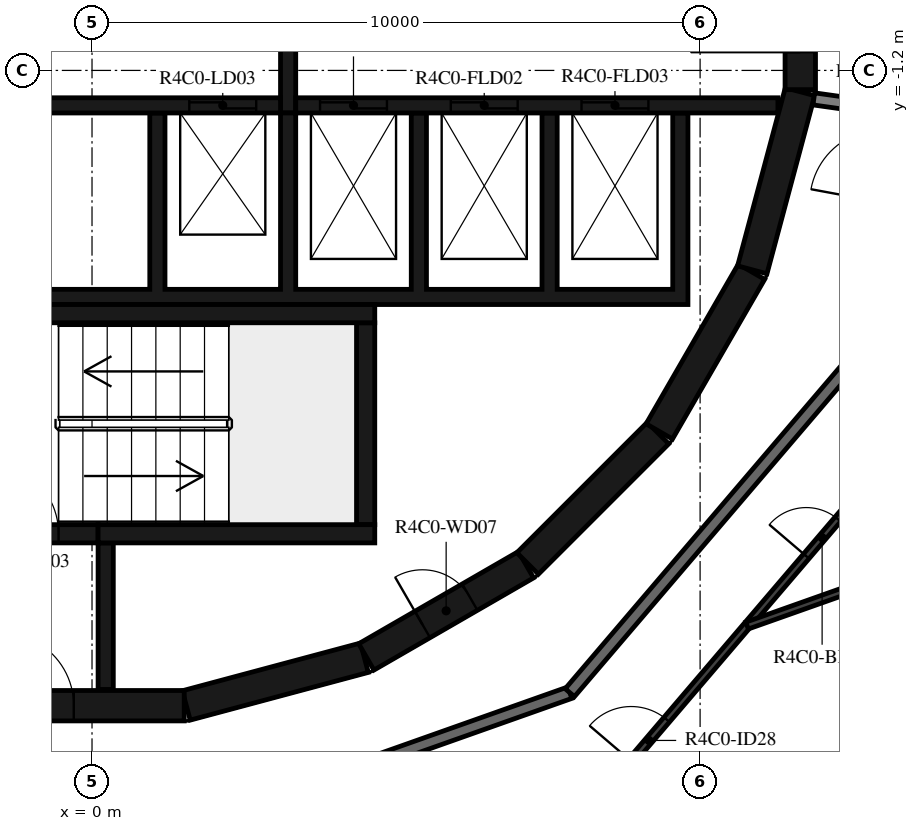
"""IFC4 building model, lengths in metres.
Left out: names, types, materials, properties, quantities, classifications, styles, units other than length and angle.
Written with IfcOpenShell. Run it as: python <this file> out.ifc"""

import sys

from ifc_helpers import new_model, si_unit, direction, frame, frame_2d, origin, place, context, subcontext, project, spatial, polyline, rectangle, outline, extrude, element, fill, save


model = new_model("IFC4")
c1 = context("Model", 3, precision=1e-05, world=origin(), true_north=direction((0.0, 1.0)))
c2 = subcontext(c1, "Body", "Model", "MODEL_VIEW")
j1 = project(units=[si_unit("LENGTHUNIT", "METRE"), si_unit("PLANEANGLEUNIT", "RADIAN")], contexts=[c1])
p1 = place(None, origin())
s1 = spatial("IfcSite", under=j1, at=p1, CompositionType="ELEMENT")
p2 = place(p1, origin())
s2 = spatial("IfcBuilding", under=s1, at=p2, CompositionType="ELEMENT")
p3 = place(p2, frame((0.0, 0.0, 179.7)))
s3 = spatial("IfcBuildingStorey", under=s2, at=p3, CompositionType="ELEMENT", Elevation=179.7)
p4 = place(p3, frame((1.55, -11.643, 0.0), z_axis=(0.0, 0.0, 1.0), x_axis=(0.965948410781, 0.258734743916, 0.0)))
e1 = element("IfcWall", 1, at=p4, inside=s3, PredefinedType="SHEAR", context=c2, shape_type="SweptSolid", body=[
    extrude(rectangle(XDim=3.033, YDim=0.5, at=frame_2d((1.516, 0.0))), origin(), (0.0, 0.0, 1.0), 3.05),
])
p5 = place(p3, frame((4.51, -10.845, 0.0), z_axis=(0.0, 0.0, 1.0), x_axis=(0.865975092491, 0.500087131594, 0.0)))
e2 = element("IfcWall", 2, at=p5, inside=s3, PredefinedType="SHEAR", context=c2, shape_type="SweptSolid", body=[
    extrude(rectangle(XDim=3.033, YDim=0.5, at=frame_2d((1.516, 0.0))), origin(), (0.0, 0.0, 1.0), 3.05),
])
p6 = place(p5, frame((1.066, 0.0, 0.0)))
e3 = element("IfcOpeningElement", 3, at=p6, cuts=e2, PredefinedType="OPENING", context=c2, shape_type="SweptSolid", body=[
    extrude(rectangle(XDim=0.9, YDim=2.1, at=frame_2d((0.45, 1.05))), frame((0.0, 0.26, 0.0), z_axis=(0.0, -1.0, 0.0), x_axis=(1.0, 0.0, 0.0)), (0.0, 0.0, 1.0), 0.52),
])
p7 = place(p3, frame((7.164, -9.308, 0.0), z_axis=(0.0, 0.0, 1.0), x_axis=(0.707106781187, 0.707106781187, 0.0)))
e4 = element("IfcWall", 4, at=p7, inside=s3, PredefinedType="SHEAR", context=c2, shape_type="SweptSolid", body=[
    extrude(rectangle(XDim=3.032, YDim=0.5, at=frame_2d((1.516, 0.0))), origin(), (0.0, 0.0, 1.0), 3.05),
])
for number, where, z_axis, x_axis in (
    (5, (9.329, -7.137, 0.0), (0.0, 0.0, 1.0), (0.5, 0.866, 0.0)),
    (6, (10.858, -4.479, 0.0), (0.0, 0.0, 1.0), (0.259, 0.966, 0.0)),
):
    element("IfcWall", number, at=place(p3, frame(where, z_axis=z_axis, x_axis=x_axis)), inside=s3, PredefinedType="SHEAR", context=c2, shape_type="SweptSolid", body=[
        extrude(rectangle(XDim=3.033, YDim=0.5, at=frame_2d((1.516, 0.0))), origin(), (0.0, 0.0, 1.0), 3.05),
    ])
p8 = place(p3, frame((11.647, -1.516, 0.0), z_axis=(0.0, 0.0, 1.0), x_axis=(0.0, 1.0, 0.0)))
e7 = element("IfcWall", 7, at=p8, inside=s3, PredefinedType="SHEAR", context=c2, shape_type="SweptSolid", body=[
    extrude(rectangle(XDim=3.033, YDim=0.5, at=frame_2d((1.516, 0.0))), origin(), (0.0, 0.0, 1.0), 3.05),
])
p9 = place(p8, frame((0.616, 0.0, 0.0)))
e8 = element("IfcOpeningElement", 8, at=p9, cuts=e7, PredefinedType="OPENING", context=c2, shape_type="SweptSolid", body=[
    extrude(rectangle(XDim=1.8, YDim=2.1, at=frame_2d((0.9, 1.05))), frame((0.0, 0.26, 0.0), z_axis=(0.0, -1.0, 0.0), x_axis=(1.0, 0.0, 0.0)), (0.0, 0.0, 1.0), 0.52),
])
p10 = place(p3, frame((-1.516, -11.647, 0.0), z_axis=(0.0, 0.0, 1.0), x_axis=(1.0, 0.0, 0.0)))
e9 = element("IfcWall", 9, at=p10, inside=s3, PredefinedType="SHEAR", context=c2, shape_type="SweptSolid", body=[
    extrude(rectangle(XDim=3.033, YDim=0.5, at=frame_2d((1.516, 0.0))), origin(), (0.0, 0.0, 1.0), 3.05),
])
p11 = place(p10, frame((0.016, 0.0, 0.0)))
e10 = element("IfcOpeningElement", 10, at=p11, cuts=e9, PredefinedType="OPENING", context=c2, shape_type="SweptSolid", body=[
    extrude(rectangle(XDim=1.2, YDim=2.1, at=frame_2d((0.6, 1.05))), frame((0.0, 0.26, 0.0), z_axis=(0.0, -1.0, 0.0), x_axis=(1.0, 0.0, 0.0)), (0.0, 0.0, 1.0), 0.52),
])
p12 = place(p3, frame((-2.4, -5.2, 0.0), z_axis=(0.0, 0.0, 1.0), x_axis=(1.0, 0.0, 0.0)))
e11 = element("IfcWall", 11, at=p12, inside=s3, PredefinedType="SHEAR", context=c2, shape_type="SweptSolid", body=[
    extrude(rectangle(XDim=7.05, YDim=0.3, at=frame_2d((3.525, 0.0))), origin(), (0.0, 0.0, 1.0), 3.05),
])
p13 = place(p3, frame((4.5, -8.67, 0.0), z_axis=(0.0, 0.0, 1.0), x_axis=(0.0, 1.0, 0.0)))
e12 = element("IfcWall", 12, at=p13, inside=s3, PredefinedType="SHEAR", context=c2, shape_type="SweptSolid", body=[
    extrude(rectangle(XDim=3.32, YDim=0.3, at=frame_2d((1.66, 0.0))), origin(), (0.0, 0.0, 1.0), 3.05),
])
p14 = place(p3, frame((0.1, -8.82, 0.0), z_axis=(0.0, 0.0, 1.0), x_axis=(1.0, 0.0, 0.0)))
e13 = element("IfcWall", 13, at=p14, inside=s3, PredefinedType="SHEAR", context=c2, shape_type="SweptSolid", body=[
    extrude(rectangle(XDim=4.55, YDim=0.3, at=frame_2d((2.275, 0.0))), origin(), (0.0, 0.0, 1.0), 3.05),
])
p15 = place(p3, frame((-2.4, -8.82, 0.0), z_axis=(0.0, 0.0, 1.0), x_axis=(1.0, 0.0, 0.0)))
e14 = element("IfcWall", 14, at=p15, inside=s3, PredefinedType="SHEAR", context=c2, shape_type="SweptSolid", body=[
    extrude(rectangle(XDim=2.5, YDim=0.3, at=frame_2d((1.25, 0.0))), origin(), (0.0, 0.0, 1.0), 3.05),
])
p16 = place(p15, frame((0.65, 0.0, 0.0)))
e15 = element("IfcOpeningElement", 15, at=p16, cuts=e14, PredefinedType="OPENING", context=c2, shape_type="SweptSolid", body=[
    extrude(rectangle(XDim=1.2, YDim=2.1, at=frame_2d((0.6, 1.05))), frame((0.0, 0.16, 0.0), z_axis=(0.0, -1.0, 0.0), x_axis=(1.0, 0.0, 0.0)), (0.0, 0.0, 1.0), 0.32),
])
p17 = place(p3, frame((0.225, -8.97, 0.0), z_axis=(0.0, 0.0, 1.0), x_axis=(0.0, -1.0, 0.0)))
e16 = element("IfcWall", 16, at=p17, inside=s3, PredefinedType="SHEAR", context=c2, shape_type="SweptSolid", body=[
    extrude(rectangle(XDim=2.41, YDim=0.25, at=frame_2d((1.205, 0.0))), origin(), (0.0, 0.0, 1.0), 3.05),
])
p18 = place(p3, origin())
e17 = element("IfcWall", 17, at=p18, inside=s3, PredefinedType="SHEAR", context=c2, shape_type="SweptSolid", body=[
    extrude(outline(polyline([(9.8, -5.05), (9.8, -4.8), (9.8, -1.9), (9.55, -1.9), (9.55, -4.8), (7.65, -4.8), (7.65, -1.9), (7.4, -1.9), (7.4, -4.8), (5.5, -4.8), (5.5, -1.9), (5.25, -1.9), (5.25, -4.8), (3.35, -4.8), (3.35, -1.9), (3.1, -1.9), (3.1, -4.8), (1.2, -4.8), (1.2, -1.9), (0.95, -1.9), (0.95, -4.8), (-5.25, -4.8), (-5.25, -1.9), (-5.5, -1.9), (-5.5, -4.8), (-7.4, -4.8), (-7.4, -1.9), (-7.65, -1.9), (-7.65, -4.8), (-9.55, -4.8), (-9.55, -1.9), (-9.8, -1.9), (-9.8, -4.8), (-9.8, -5.05), (9.8, -5.05)])), origin(), (0.0, 0.0, 1.0), 3.05),
])
p19 = place(p3, frame((-11.28, -1.775, 0.0), z_axis=(0.0, 0.0, 1.0), x_axis=(1.0, 0.0, 0.0)))
e18 = element("IfcWall", 18, at=p19, inside=s3, PredefinedType="SHEAR", context=c2, shape_type="SweptSolid", body=[
    extrude(rectangle(XDim=14.38, YDim=0.25, at=frame_2d((7.19, 0.0))), origin(), (0.0, 0.0, 1.0), 3.05),
])
p20 = place(p19, frame((12.88, 0.0, 0.0)))
e19 = element("IfcOpeningElement", 19, at=p20, cuts=e18, PredefinedType="OPENING", context=c2, shape_type="SweptSolid", body=[
    extrude(rectangle(XDim=1.1, YDim=2.1, at=frame_2d((0.55, 1.05))), frame((0.0, 0.135, 0.0), z_axis=(0.0, -1.0, 0.0), x_axis=(1.0, 0.0, 0.0)), (0.0, 0.0, 1.0), 0.27),
])
p21 = place(p19, frame((8.68, 0.0, 0.0)))
e20 = element("IfcOpeningElement", 20, at=p21, cuts=e18, PredefinedType="OPENING", context=c2, shape_type="SweptSolid", body=[
    extrude(rectangle(XDim=0.9, YDim=2.1, at=frame_2d((0.45, 1.05))), frame((0.0, 0.135, 0.0), z_axis=(0.0, -1.0, 0.0), x_axis=(1.0, 0.0, 0.0)), (0.0, 0.0, 1.0), 0.27),
])
p22 = place(p3, frame((3.35, -1.775, 0.0), z_axis=(0.0, 0.0, 1.0), x_axis=(1.0, 0.0, 0.0)))
e21 = element("IfcWall", 21, at=p22, inside=s3, PredefinedType="SHEAR", context=c2, shape_type="SweptSolid", body=[
    extrude(rectangle(XDim=7.93, YDim=0.25, at=frame_2d((3.965, 0.0))), origin(), (0.0, 0.0, 1.0), 3.05),
])
p23 = place(p22, frame((0.4, 0.0, 0.0)))
e22 = element("IfcOpeningElement", 22, at=p23, cuts=e21, PredefinedType="OPENING", context=c2, shape_type="SweptSolid", body=[
    extrude(rectangle(XDim=1.1, YDim=2.4, at=frame_2d((0.55, 1.2))), frame((0.0, 0.135, 0.0), z_axis=(0.0, -1.0, 0.0), x_axis=(1.0, 0.0, 0.0)), (0.0, 0.0, 1.0), 0.27),
])
p24 = place(p22, frame((2.55, 0.0, 0.0)))
e23 = element("IfcOpeningElement", 23, at=p24, cuts=e21, PredefinedType="OPENING", context=c2, shape_type="SweptSolid", body=[
    extrude(rectangle(XDim=1.1, YDim=2.4, at=frame_2d((0.55, 1.2))), frame((0.0, 0.135, 0.0), z_axis=(0.0, -1.0, 0.0), x_axis=(1.0, 0.0, 0.0)), (0.0, 0.0, 1.0), 0.27),
])
p25 = place(p22, frame((4.7, 0.0, 0.0)))
e24 = element("IfcOpeningElement", 24, at=p25, cuts=e21, PredefinedType="OPENING", context=c2, shape_type="SweptSolid", body=[
    extrude(rectangle(XDim=1.1, YDim=2.4, at=frame_2d((0.55, 1.2))), frame((0.0, 0.135, 0.0), z_axis=(0.0, -1.0, 0.0), x_axis=(1.0, 0.0, 0.0)), (0.0, 0.0, 1.0), 0.27),
])
p26 = place(p3, frame((3.225, -1.9, 0.0), z_axis=(0.0, 0.0, 1.0), x_axis=(0.0, 1.0, 0.0)))
e25 = element("IfcWall", 25, at=p26, inside=s3, PredefinedType="SHEAR", context=c2, shape_type="SweptSolid", body=[
    extrude(rectangle(XDim=3.8, YDim=0.25, at=frame_2d((1.9, 0.0))), origin(), (0.0, 0.0, 1.0), 3.05),
])
p27 = place(p3, frame((13.282, -1.867, 0.0), z_axis=(0.0, 0.0, 1.0), x_axis=(-0.990265430288, 0.139191873241, 0.0)))
e26 = element("IfcWall", 26, at=p27, inside=s3, PredefinedType="STANDARD", context=c2, shape_type="SweptSolid", body=[
    extrude(rectangle(XDim=1.426, YDim=0.2, at=frame_2d((0.713, 0.0))), origin(), (0.0, 0.0, 1.0), 3.05),
])
p28 = place(p3, frame((1.088, -13.83, 0.0), z_axis=(0.0, 0.0, 1.0), x_axis=(0.942648397945, 0.333787354241, 0.0)))
e27 = element("IfcWall", 27, at=p28, inside=s3, PredefinedType="STANDARD", context=c2, shape_type="SweptSolid", body=[
    extrude(rectangle(XDim=7.181, YDim=0.2, at=frame_2d((3.591, 0.0))), origin(), (0.0, 0.0, 1.0), 3.05),
])
p29 = place(p28, frame((0.2, 0.0, 0.0)))
e28 = element("IfcOpeningElement", 28, at=p29, cuts=e27, PredefinedType="OPENING", context=c2, shape_type="SweptSolid", body=[
    extrude(rectangle(XDim=1.0, YDim=2.1, at=frame_2d((0.5, 1.05))), frame((0.0, 0.11, 0.0), z_axis=(0.0, -1.0, 0.0), x_axis=(1.0, 0.0, 0.0)), (0.0, 0.0, 1.0), 0.22),
])
p30 = place(p3, frame((7.858, -11.433, 0.0), z_axis=(0.0, 0.0, 1.0), x_axis=(0.649440801937, 0.760412154545, 0.0)))
e29 = element("IfcWall", 29, at=p30, inside=s3, PredefinedType="STANDARD", context=c2, shape_type="SweptSolid", body=[
    extrude(rectangle(XDim=7.181, YDim=0.2, at=frame_2d((3.59, 0.0))), origin(), (0.0, 0.0, 1.0), 3.05),
])
p31 = place(p3, frame((8.737, -12.713, 0.0), z_axis=(0.0, 0.0, 1.0), x_axis=(0.649427973074, 0.760423111031, 0.0)))
e30 = element("IfcWall", 30, at=p31, inside=s3, PredefinedType="PARTITIONING", context=c2, shape_type="SweptSolid", body=[
    extrude(rectangle(XDim=7.571, YDim=0.12, at=frame_2d((3.785, 0.0))), origin(), (0.0, 0.0, 1.0), 3.05),
])
p32 = place(p31, frame((0.2, 0.0, 0.0)))
e31 = element("IfcOpeningElement", 31, at=p32, cuts=e30, PredefinedType="OPENING", context=c2, shape_type="SweptSolid", body=[
    extrude(rectangle(XDim=0.9, YDim=2.1, at=frame_2d((0.45, 1.05))), frame((0.0, 0.07, 0.0), z_axis=(0.0, -1.0, 0.0), x_axis=(1.0, 0.0, 0.0)), (0.0, 0.0, 1.0), 0.14),
])
p33 = place(p31, frame((4.634, 0.0, 0.0)))
e32 = element("IfcOpeningElement", 32, at=p33, cuts=e30, PredefinedType="OPENING", context=c2, shape_type="SweptSolid", body=[
    extrude(rectangle(XDim=0.8, YDim=2.1, at=frame_2d((0.4, 1.05))), frame((0.0, 0.07, 0.0), z_axis=(0.0, -1.0, 0.0), x_axis=(1.0, 0.0, 0.0)), (0.0, 0.0, 1.0), 0.14),
])
p34 = place(p3, frame((21.362, -6.58, 0.0), z_axis=(0.0, 0.0, 1.0), x_axis=(-0.942647598157, -0.333789612913, 0.0)))
e33 = element("IfcWall", 33, at=p34, inside=s3, PredefinedType="PARTITIONING", context=c2, shape_type="SweptSolid", body=[
    extrude(rectangle(XDim=11.234, YDim=0.12, at=frame_2d((5.617, 0.0))), origin(), (0.0, 0.0, 1.0), 3.05),
])
p35 = place(p16, origin())
e34 = element("IfcDoor", 34, at=p35, inside=s3, OperationType="SINGLE_SWING_LEFT", PredefinedType="DOOR", context=c2, shape_type="SweptSolid", body=[
    extrude(rectangle(XDim=1.2, YDim=2.1, at=frame_2d((0.6, 1.05))), frame((0.0, 0.025, 0.0), z_axis=(0.0, -1.0, 0.0), x_axis=(1.0, 0.0, 0.0)), (0.0, 0.0, 1.0), 0.05),
])
fill(e15, e34)
p36 = place(p11, origin())
e35 = element("IfcDoor", 35, at=p36, inside=s3, OperationType="SINGLE_SWING_RIGHT", PredefinedType="DOOR", context=c2, shape_type="SweptSolid", body=[
    extrude(rectangle(XDim=1.2, YDim=2.1, at=frame_2d((0.6, 1.05))), frame((0.0, 0.025, 0.0), z_axis=(0.0, -1.0, 0.0), x_axis=(1.0, 0.0, 0.0)), (0.0, 0.0, 1.0), 0.05),
])
fill(e10, e35)
p37 = place(p9, origin())
e36 = element("IfcDoor", 36, at=p37, inside=s3, OperationType="DOUBLE_DOOR_SINGLE_SWING", PredefinedType="DOOR", context=c2, shape_type="SweptSolid", body=[
    extrude(rectangle(XDim=1.8, YDim=2.1, at=frame_2d((0.9, 1.05))), frame((0.0, 0.025, 0.0), z_axis=(0.0, -1.0, 0.0), x_axis=(1.0, 0.0, 0.0)), (0.0, 0.0, 1.0), 0.05),
])
fill(e8, e36)
p38 = place(p20, origin())
e37 = element("IfcDoor", 37, at=p38, inside=s3, OperationType="DOUBLE_DOOR_SLIDING", PredefinedType="DOOR", context=c2, shape_type="SweptSolid", body=[
    extrude(rectangle(XDim=1.1, YDim=2.1, at=frame_2d((0.55, 1.05))), frame((0.0, 0.025, 0.0), z_axis=(0.0, -1.0, 0.0), x_axis=(1.0, 0.0, 0.0)), (0.0, 0.0, 1.0), 0.05),
])
fill(e19, e37)
p39 = place(p23, origin())
e38 = element("IfcDoor", 38, at=p39, inside=s3, OperationType="DOUBLE_DOOR_SLIDING", PredefinedType="DOOR", context=c2, shape_type="SweptSolid", body=[
    extrude(rectangle(XDim=1.1, YDim=2.4, at=frame_2d((0.55, 1.2))), frame((0.0, 0.025, 0.0), z_axis=(0.0, -1.0, 0.0), x_axis=(1.0, 0.0, 0.0)), (0.0, 0.0, 1.0), 0.05),
])
fill(e22, e38)
p40 = place(p24, origin())
e39 = element("IfcDoor", 39, at=p40, inside=s3, OperationType="DOUBLE_DOOR_SLIDING", PredefinedType="DOOR", context=c2, shape_type="SweptSolid", body=[
    extrude(rectangle(XDim=1.1, YDim=2.4, at=frame_2d((0.55, 1.2))), frame((0.0, 0.025, 0.0), z_axis=(0.0, -1.0, 0.0), x_axis=(1.0, 0.0, 0.0)), (0.0, 0.0, 1.0), 0.05),
])
fill(e23, e39)
p41 = place(p25, origin())
e40 = element("IfcDoor", 40, at=p41, inside=s3, OperationType="DOUBLE_DOOR_SLIDING", PredefinedType="DOOR", context=c2, shape_type="SweptSolid", body=[
    extrude(rectangle(XDim=1.1, YDim=2.4, at=frame_2d((0.55, 1.2))), frame((0.0, 0.025, 0.0), z_axis=(0.0, -1.0, 0.0), x_axis=(1.0, 0.0, 0.0)), (0.0, 0.0, 1.0), 0.05),
])
fill(e24, e40)
p42 = place(p6, origin())
e41 = element("IfcDoor", 41, at=p42, inside=s3, OperationType="SINGLE_SWING_LEFT", PredefinedType="DOOR", context=c2, shape_type="SweptSolid", body=[
    extrude(rectangle(XDim=0.9, YDim=2.1, at=frame_2d((0.45, 1.05))), frame((0.0, 0.025, 0.0), z_axis=(0.0, -1.0, 0.0), x_axis=(1.0, 0.0, 0.0)), (0.0, 0.0, 1.0), 0.05),
])
fill(e3, e41)
p43 = place(p32, origin())
e42 = element("IfcDoor", 42, at=p43, inside=s3, OperationType="SINGLE_SWING_RIGHT", PredefinedType="DOOR", context=c2, shape_type="SweptSolid", body=[
    extrude(rectangle(XDim=0.9, YDim=2.1, at=frame_2d((0.45, 1.05))), frame((0.0, 0.025, 0.0), z_axis=(0.0, -1.0, 0.0), x_axis=(1.0, 0.0, 0.0)), (0.0, 0.0, 1.0), 0.05),
])
fill(e31, e42)
p44 = place(p33, origin())
e43 = element("IfcDoor", 43, at=p44, inside=s3, OperationType="SINGLE_SWING_RIGHT", PredefinedType="DOOR", context=c2, shape_type="SweptSolid", body=[
    extrude(rectangle(XDim=0.8, YDim=2.1, at=frame_2d((0.4, 1.05))), frame((0.0, 0.025, 0.0), z_axis=(0.0, -1.0, 0.0), x_axis=(1.0, 0.0, 0.0)), (0.0, 0.0, 1.0), 0.05),
])
fill(e32, e43)
save(model, sys.argv[1])
